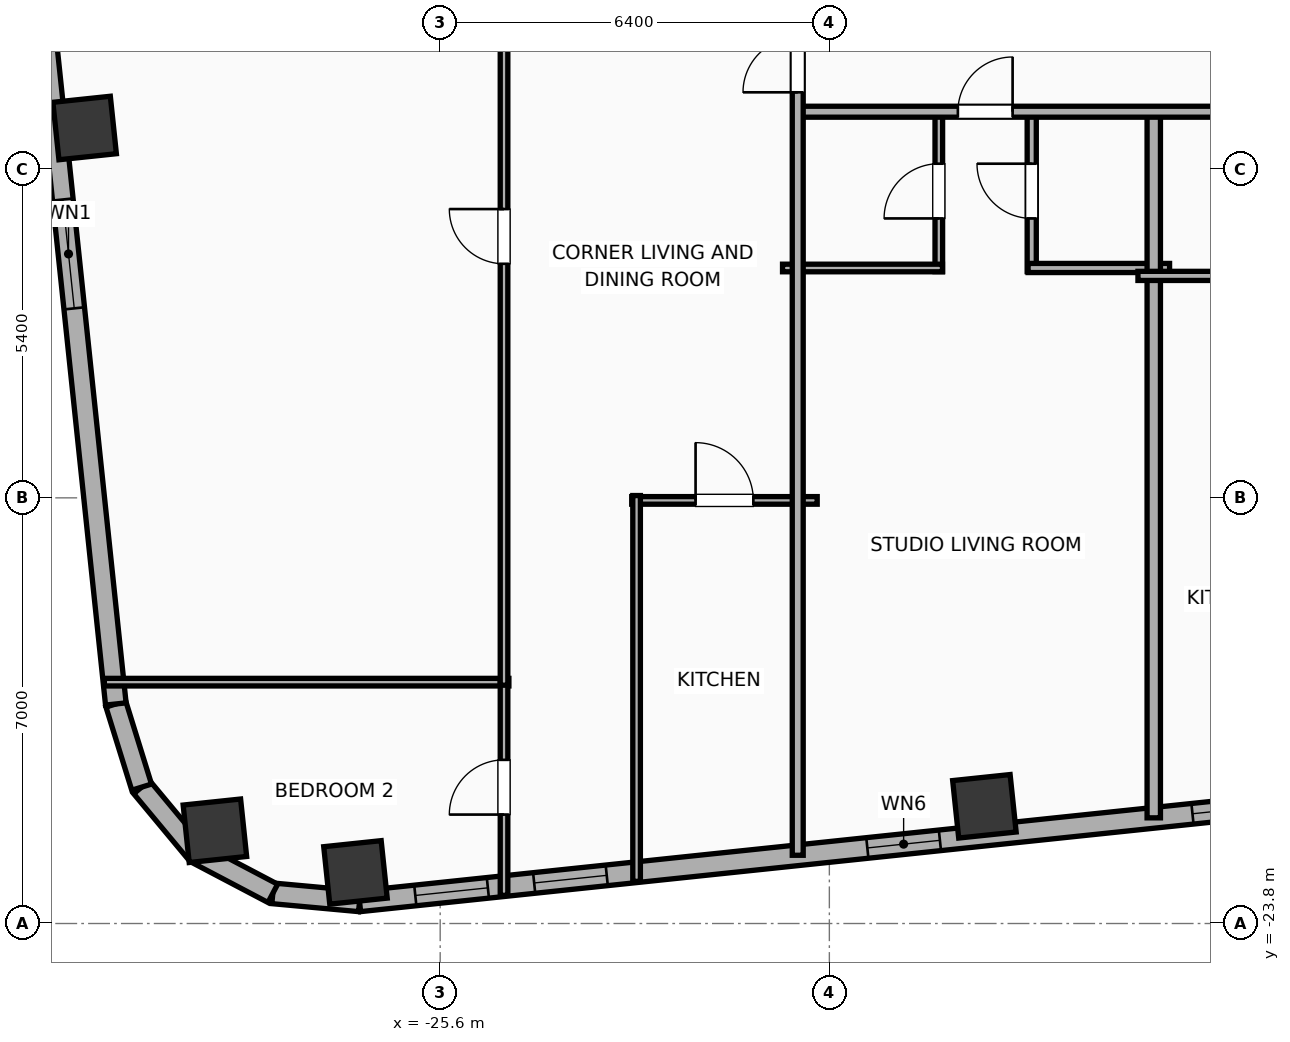
"""IFC4 building model, lengths in metres.
Left out: names, types, materials, properties, quantities, classifications, styles, units other than length and angle.
Written with IfcOpenShell. Run it as: python <this file> out.ifc"""

import sys

from ifc_helpers import new_model, si_unit, direction, frame, frame_2d, origin, origin_2d, place, context, subcontext, project, spatial, rectangle, hollow_rectangle, hollow_circle, extrude, element, fill, save


model = new_model("IFC4")
c1 = context("Model", 3, precision=1e-05, world=origin(), true_north=direction((0.0, 1.0)))
c2 = subcontext(c1, "Body", "Model", "MODEL_VIEW")
j1 = project(units=[si_unit("LENGTHUNIT", "METRE"), si_unit("PLANEANGLEUNIT", "RADIAN")], contexts=[c1])
p1 = place(None, origin())
s1 = spatial("IfcSite", under=j1, at=p1, CompositionType="ELEMENT")
p2 = place(p1, origin())
s2 = spatial("IfcBuilding", under=s1, at=p2, CompositionType="ELEMENT")
p3 = place(p2, frame((0.0, 0.0, 159.9)))
s3 = spatial("IfcBuildingStorey", under=s2, at=p3, CompositionType="ELEMENT", Elevation=159.9)
for number, where, z_axis, x_axis in (
    (1, (-26.993, -22.959, 0.0), (0.0, 0.0, 1.0), (0.995, 0.105, 0.0)),
    (2, (-16.65, -21.873, 0.0), (0.0, 0.0, 1.0), (0.995, 0.105, 0.0)),
    (3, (-31.447, -10.718, 0.0), (0.0, 0.0, 1.0), (0.995, 0.105, 0.0)),
):
    element("IfcColumn", number, at=place(p3, frame(where, z_axis=z_axis, x_axis=x_axis)), inside=s3, PredefinedType="COLUMN", context=c2, shape_type="SweptSolid", body=[
        extrude(hollow_rectangle(XDim=0.95, YDim=0.95, WallThickness=0.032, at=origin_2d()), origin(), (0.0, 0.0, 1.0), 3.9),
    ])
p4 = place(p3, frame((-29.305, -22.275, 0.0), z_axis=(0.0, 0.0, 1.0), x_axis=(0.994521895368, 0.104528463268, 0.0)))
e4 = element("IfcColumn", 4, at=p4, inside=s3, PredefinedType="COLUMN", context=c2, shape_type="SweptSolid", body=[
    extrude(hollow_circle(Radius=0.475, WallThickness=0.032, at=origin_2d()), origin(), (0.0, 0.0, 1.0), 3.9),
])
p5 = place(p3, frame((24.756, -18.003, 0.0), z_axis=(0.0, 0.0, 1.0), x_axis=(-0.99452160744, -0.104531202687, 0.0)))
e5 = element("IfcWall", 5, at=p5, inside=s3, PredefinedType="ELEMENTEDWALL", context=c2, shape_type="SweptSolid", body=[
    extrude(rectangle(XDim=51.967, YDim=0.34, at=frame_2d((25.983, 0.0))), origin(), (0.0, 0.0, 1.0), 3.65),
])
p6 = place(p5, frame((25.633, 0.0, 0.75)))
e6 = element("IfcOpeningElement", 6, at=p6, cuts=e5, PredefinedType="OPENING", context=c2, shape_type="SweptSolid", body=[
    extrude(rectangle(XDim=2.4, YDim=2.1, at=frame_2d((1.2, 1.05))), frame((0.0, 0.18, 0.0), z_axis=(0.0, -1.0, 0.0), x_axis=(1.0, 0.0, 0.0)), (0.0, 0.0, 1.0), 0.36),
])
p7 = place(p5, frame((42.369, 0.0, 0.75)))
e7 = element("IfcOpeningElement", 7, at=p7, cuts=e5, PredefinedType="OPENING", context=c2, shape_type="SweptSolid", body=[
    extrude(rectangle(XDim=1.2, YDim=2.05, at=frame_2d((0.6, 1.025))), frame((0.0, 0.18, 0.0), z_axis=(0.0, -1.0, 0.0), x_axis=(1.0, 0.0, 0.0)), (0.0, 0.0, 1.0), 0.36),
])
p8 = place(p5, frame((34.085, 0.0, 0.75)))
e8 = element("IfcOpeningElement", 8, at=p8, cuts=e5, PredefinedType="OPENING", context=c2, shape_type="SweptSolid", body=[
    extrude(rectangle(XDim=1.2, YDim=2.05, at=frame_2d((0.6, 1.025))), frame((0.0, 0.18, 0.0), z_axis=(0.0, -1.0, 0.0), x_axis=(1.0, 0.0, 0.0)), (0.0, 0.0, 1.0), 0.36),
])
p9 = place(p5, frame((36.993, 0.0, 0.75)))
e9 = element("IfcOpeningElement", 9, at=p9, cuts=e5, PredefinedType="OPENING", context=c2, shape_type="SweptSolid", body=[
    extrude(rectangle(XDim=1.2, YDim=2.05, at=frame_2d((0.6, 1.025))), frame((0.0, 0.18, 0.0), z_axis=(0.0, -1.0, 0.0), x_axis=(1.0, 0.0, 0.0)), (0.0, 0.0, 1.0), 0.36),
])
p10 = place(p5, frame((14.397, 0.0, 0.75)))
e10 = element("IfcOpeningElement", 10, at=p10, cuts=e5, PredefinedType="OPENING", context=c2, shape_type="SweptSolid", body=[
    extrude(rectangle(XDim=1.2, YDim=2.05, at=frame_2d((0.6, 1.025))), frame((0.0, 0.18, 0.0), z_axis=(0.0, -1.0, 0.0), x_axis=(1.0, 0.0, 0.0)), (0.0, 0.0, 1.0), 0.36),
])
p11 = place(p5, frame((11.489, 0.0, 0.75)))
e11 = element("IfcOpeningElement", 11, at=p11, cuts=e5, PredefinedType="OPENING", context=c2, shape_type="SweptSolid", body=[
    extrude(rectangle(XDim=1.2, YDim=2.05, at=frame_2d((0.6, 1.025))), frame((0.0, 0.18, 0.0), z_axis=(0.0, -1.0, 0.0), x_axis=(1.0, 0.0, 0.0)), (0.0, 0.0, 1.0), 0.36),
])
p12 = place(p5, frame((8.521, 0.0, 0.75)))
e12 = element("IfcOpeningElement", 12, at=p12, cuts=e5, PredefinedType="OPENING", context=c2, shape_type="SweptSolid", body=[
    extrude(rectangle(XDim=1.2, YDim=2.05, at=frame_2d((0.6, 1.025))), frame((0.0, 0.18, 0.0), z_axis=(0.0, -1.0, 0.0), x_axis=(1.0, 0.0, 0.0)), (0.0, 0.0, 1.0), 0.36),
])
p13 = place(p5, frame((5.582, 0.0, 0.75)))
e13 = element("IfcOpeningElement", 13, at=p13, cuts=e5, PredefinedType="OPENING", context=c2, shape_type="SweptSolid", body=[
    extrude(rectangle(XDim=1.2, YDim=2.05, at=frame_2d((0.6, 1.025))), frame((0.0, 0.18, 0.0), z_axis=(0.0, -1.0, 0.0), x_axis=(1.0, 0.0, 0.0)), (0.0, 0.0, 1.0), 0.36),
])
p14 = place(p5, frame((29.313, 0.0, 0.75)))
e14 = element("IfcOpeningElement", 14, at=p14, cuts=e5, PredefinedType="OPENING", context=c2, shape_type="SweptSolid", body=[
    extrude(rectangle(XDim=1.2, YDim=2.05, at=frame_2d((0.6, 1.025))), frame((0.0, 0.18, 0.0), z_axis=(0.0, -1.0, 0.0), x_axis=(1.0, 0.0, 0.0)), (0.0, 0.0, 1.0), 0.36),
])
p15 = place(p5, frame((22.248, 0.0, 0.75)))
e15 = element("IfcOpeningElement", 15, at=p15, cuts=e5, PredefinedType="OPENING", context=c2, shape_type="SweptSolid", body=[
    extrude(rectangle(XDim=1.2, YDim=2.05, at=frame_2d((0.6, 1.025))), frame((0.0, 0.18, 0.0), z_axis=(0.0, -1.0, 0.0), x_axis=(1.0, 0.0, 0.0)), (0.0, 0.0, 1.0), 0.36),
])
p16 = place(p5, frame((18.186, 0.0, 0.75)))
e16 = element("IfcOpeningElement", 16, at=p16, cuts=e5, PredefinedType="OPENING", context=c2, shape_type="SweptSolid", body=[
    extrude(rectangle(XDim=1.2, YDim=2.05, at=frame_2d((0.6, 1.025))), frame((0.0, 0.18, 0.0), z_axis=(0.0, -1.0, 0.0), x_axis=(1.0, 0.0, 0.0)), (0.0, 0.0, 1.0), 0.36),
])
p17 = place(p5, frame((47.879, 0.0, 0.75)))
e17 = element("IfcOpeningElement", 17, at=p17, cuts=e5, PredefinedType="OPENING", context=c2, shape_type="SweptSolid", body=[
    extrude(rectangle(XDim=1.2, YDim=2.05, at=frame_2d((0.6, 1.025))), frame((0.0, 0.18, 0.0), z_axis=(0.0, -1.0, 0.0), x_axis=(1.0, 0.0, 0.0)), (0.0, 0.0, 1.0), 0.36),
])
p18 = place(p5, frame((49.844, 0.0, 0.75)))
e18 = element("IfcOpeningElement", 18, at=p18, cuts=e5, PredefinedType="OPENING", context=c2, shape_type="SweptSolid", body=[
    extrude(rectangle(XDim=1.2, YDim=2.05, at=frame_2d((0.6, 1.025))), frame((0.0, 0.18, 0.0), z_axis=(0.0, -1.0, 0.0), x_axis=(1.0, 0.0, 0.0)), (0.0, 0.0, 1.0), 0.36),
])
p19 = place(p3, frame((-26.926, -23.435, 0.0), z_axis=(0.0, 0.0, 1.0), x_axis=(-0.995800460351, 0.091550222087, 0.0)))
e19 = element("IfcWall", 19, at=p19, inside=s3, PredefinedType="ELEMENTEDWALL", context=c2, shape_type="SweptSolid", body=[
    extrude(rectangle(XDim=1.432, YDim=0.34, at=frame_2d((0.716, 0.0))), origin(), (0.0, 0.0, 1.0), 3.65),
])
p20 = place(p3, frame((-28.352, -23.304, 0.0), z_axis=(0.0, 0.0, 1.0), x_axis=(-0.884989312682, 0.465611336243, 0.0)))
e20 = element("IfcWall", 20, at=p20, inside=s3, PredefinedType="ELEMENTEDWALL", context=c2, shape_type="SweptSolid", body=[
    extrude(rectangle(XDim=1.415, YDim=0.34, at=frame_2d((0.708, 0.0))), origin(), (0.0, 0.0, 1.0), 3.65),
])
p21 = place(p3, frame((-29.605, -22.645, 0.0), z_axis=(0.0, 0.0, 1.0), x_axis=(-0.639437361921, 0.768843196093, 0.0)))
e21 = element("IfcWall", 21, at=p21, inside=s3, PredefinedType="ELEMENTEDWALL", context=c2, shape_type="SweptSolid", body=[
    extrude(rectangle(XDim=1.415, YDim=0.34, at=frame_2d((0.708, 0.0))), origin(), (0.0, 0.0, 1.0), 3.65),
])
p22 = place(p3, frame((-30.51, -21.557, 0.0), z_axis=(0.0, 0.0, 1.0), x_axis=(-0.296624409546, 0.9549942197, 0.0)))
e22 = element("IfcWall", 22, at=p22, inside=s3, PredefinedType="ELEMENTEDWALL", context=c2, shape_type="SweptSolid", body=[
    extrude(rectangle(XDim=1.432, YDim=0.34, at=frame_2d((0.716, 0.0))), origin(), (0.0, 0.0, 1.0), 3.65),
])
p23 = place(p3, frame((-30.934, -20.19, 0.0), z_axis=(0.0, 0.0, 1.0), x_axis=(-0.10452691388, 0.994522058214, 0.0)))
e23 = element("IfcWall", 23, at=p23, inside=s3, PredefinedType="ELEMENTEDWALL", context=c2, shape_type="SweptSolid", body=[
    extrude(rectangle(XDim=33.167, YDim=0.34, at=frame_2d((16.583, 0.0))), origin(), (0.0, 0.0, 1.0), 3.65),
])
p24 = place(p23, frame((6.542, 0.0, 0.75)))
e24 = element("IfcOpeningElement", 24, at=p24, cuts=e23, PredefinedType="OPENING", context=c2, shape_type="SweptSolid", body=[
    extrude(rectangle(XDim=1.8, YDim=2.1, at=frame_2d((0.9, 1.05))), frame((0.0, 0.18, 0.0), z_axis=(0.0, -1.0, 0.0), x_axis=(1.0, 0.0, 0.0)), (0.0, 0.0, 1.0), 0.36),
])
p25 = place(p23, frame((24.825, 0.0, 0.75)))
e25 = element("IfcOpeningElement", 25, at=p25, cuts=e23, PredefinedType="OPENING", context=c2, shape_type="SweptSolid", body=[
    extrude(rectangle(XDim=1.8, YDim=2.1, at=frame_2d((0.9, 1.05))), frame((0.0, 0.18, 0.0), z_axis=(0.0, -1.0, 0.0), x_axis=(1.0, 0.0, 0.0)), (0.0, 0.0, 1.0), 0.36),
])
p26 = place(p23, frame((16.344, 0.0, 0.75)))
e26 = element("IfcOpeningElement", 26, at=p26, cuts=e23, PredefinedType="OPENING", context=c2, shape_type="SweptSolid", body=[
    extrude(rectangle(XDim=1.2, YDim=2.05, at=frame_2d((0.6, 1.025))), frame((0.0, 0.18, 0.0), z_axis=(0.0, -1.0, 0.0), x_axis=(1.0, 0.0, 0.0)), (0.0, 0.0, 1.0), 0.36),
])
p27 = place(p23, frame((19.811, 0.0, 0.75)))
e27 = element("IfcOpeningElement", 27, at=p27, cuts=e23, PredefinedType="OPENING", context=c2, shape_type="SweptSolid", body=[
    extrude(rectangle(XDim=1.2, YDim=2.05, at=frame_2d((0.6, 1.025))), frame((0.0, 0.18, 0.0), z_axis=(0.0, -1.0, 0.0), x_axis=(1.0, 0.0, 0.0)), (0.0, 0.0, 1.0), 0.36),
])
p28 = place(p3, frame((-17.4, -13.08, 0.0), z_axis=(0.0, 0.0, 1.0), x_axis=(0.0, 1.0, 0.0)))
e28 = element("IfcWall", 28, at=p28, inside=s3, PredefinedType="PARTITIONING", context=c2, shape_type="SweptSolid", body=[
    extrude(rectangle(XDim=2.65, YDim=0.125, at=frame_2d((1.325, 0.0))), origin(), (0.0, 0.0, 1.0), 3.65),
])
p29 = place(p28, frame((0.875, 0.0, 0.0)))
e29 = element("IfcOpeningElement", 29, at=p29, cuts=e28, PredefinedType="OPENING", context=c2, shape_type="SweptSolid", body=[
    extrude(rectangle(XDim=0.9, YDim=2.05, at=frame_2d((0.45, 1.025))), frame((0.0, 0.073, 0.0), z_axis=(0.0, -1.0, 0.0), x_axis=(1.0, 0.0, 0.0)), (0.0, 0.0, 1.0), 0.145),
])
p30 = place(p3, frame((-15.872, -13.08, 0.0), z_axis=(0.0, 0.0, 1.0), x_axis=(0.0, 1.0, 0.0)))
e30 = element("IfcWall", 30, at=p30, inside=s3, PredefinedType="PLUMBINGWALL", context=c2, shape_type="SweptSolid", body=[
    extrude(rectangle(XDim=2.65, YDim=0.15, at=frame_2d((1.325, 0.0))), origin(), (0.0, 0.0, 1.0), 3.04),
])
p31 = place(p30, frame((0.875, 0.0, 0.0)))
e31 = element("IfcOpeningElement", 31, at=p31, cuts=e30, PredefinedType="OPENING", context=c2, shape_type="SweptSolid", body=[
    extrude(rectangle(XDim=0.9, YDim=2.05, at=frame_2d((0.45, 1.025))), frame((0.0, 0.085, 0.0), z_axis=(0.0, -1.0, 0.0), x_axis=(1.0, 0.0, 0.0)), (0.0, 0.0, 1.0), 0.17),
])
p32 = place(p3, frame((-19.97, -13.02, 0.0), z_axis=(0.0, 0.0, 1.0), x_axis=(1.0, 0.0, 0.0)))
e32 = element("IfcWall", 32, at=p32, inside=s3, PredefinedType="PARTITIONING", context=c2, shape_type="SweptSolid", body=[
    extrude(rectangle(XDim=2.63, YDim=0.125, at=frame_2d((1.315, 0.0))), origin(), (0.0, 0.0, 1.0), 3.65),
])
p33 = place(p3, frame((-15.932, -13.02, 0.0), z_axis=(0.0, 0.0, 1.0), x_axis=(1.0, 0.0, 0.0)))
e33 = element("IfcWall", 33, at=p33, inside=s3, PredefinedType="PLUMBINGWALL", context=c2, shape_type="SweptSolid", body=[
    extrude(rectangle(XDim=2.327, YDim=0.15, at=frame_2d((1.164, 0.0))), origin(), (0.0, 0.0, 1.0), 3.65),
])
p34 = place(p3, frame((-13.865, -22.062, 0.0), z_axis=(0.0, 0.0, 1.0), x_axis=(0.0, 1.0, 0.0)))
e34 = element("IfcWall", 34, at=p34, inside=s3, PredefinedType="PARTITIONING", context=c2, shape_type="SweptSolid", body=[
    extrude(rectangle(XDim=11.692, YDim=0.22, at=frame_2d((5.846, 0.0))), origin(), (0.0, 0.0, 1.0), 3.65),
])
p35 = place(p3, frame((-14.125, -13.15, 0.0), z_axis=(0.0, 0.0, 1.0), x_axis=(1.0, 0.0, 0.0)))
e35 = element("IfcWall", 35, at=p35, inside=s3, PredefinedType="PLUMBINGWALL", context=c2, shape_type="SweptSolid", body=[
    extrude(rectangle(XDim=2.802, YDim=0.15, at=frame_2d((1.401, 0.0))), origin(), (0.0, 0.0, 1.0), 3.65),
])
p36 = place(p3, frame((-19.75, -10.45, 0.0), z_axis=(0.0, 0.0, 1.0), x_axis=(1.0, 0.0, 0.0)))
e36 = element("IfcWall", 36, at=p36, inside=s3, PredefinedType="PARTITIONING", context=c2, shape_type="SweptSolid", body=[
    extrude(rectangle(XDim=11.67, YDim=0.18, at=frame_2d((5.835, 0.0))), origin(), (0.0, 0.0, 1.0), 3.65),
])
p37 = place(p36, frame((2.664, 0.0, 0.0)))
e37 = element("IfcOpeningElement", 37, at=p37, cuts=e36, PredefinedType="OPENING", context=c2, shape_type="SweptSolid", body=[
    extrude(rectangle(XDim=0.9, YDim=2.05, at=frame_2d((0.45, 1.025))), frame((0.0, 0.1, 0.0), z_axis=(0.0, -1.0, 0.0), x_axis=(1.0, 0.0, 0.0)), (0.0, 0.0, 1.0), 0.2),
])
p38 = place(p36, frame((9.404, 0.0, 0.0)))
e38 = element("IfcOpeningElement", 38, at=p38, cuts=e36, PredefinedType="OPENING", context=c2, shape_type="SweptSolid", body=[
    extrude(rectangle(XDim=1.15, YDim=2.05, at=frame_2d((0.575, 1.025))), frame((0.0, 0.1, 0.0), z_axis=(0.0, -1.0, 0.0), x_axis=(1.0, 0.0, 0.0)), (0.0, 0.0, 1.0), 0.2),
])
p39 = place(p3, frame((-31.123, -19.831, 0.0), z_axis=(0.0, 0.0, 1.0), x_axis=(1.0, 0.0, 0.0)))
e39 = element("IfcWall", 39, at=p39, inside=s3, PredefinedType="PARTITIONING", context=c2, shape_type="SweptSolid", body=[
    extrude(rectangle(XDim=6.653, YDim=0.125, at=frame_2d((3.326, 0.0))), origin(), (0.0, 0.0, 1.0), 3.65),
])
p40 = place(p3, frame((-24.55, -23.336, 0.0), z_axis=(0.0, 0.0, 1.0), x_axis=(0.0, 1.0, 0.0)))
e40 = element("IfcWall", 40, at=p40, inside=s3, PredefinedType="PARTITIONING", context=c2, shape_type="SweptSolid", body=[
    extrude(rectangle(XDim=3.555, YDim=0.125, at=frame_2d((1.778, 0.0))), origin(), (0.0, 0.0, 1.0), 3.65),
])
p41 = place(p40, frame((1.328, 0.0, 0.0)))
e41 = element("IfcOpeningElement", 41, at=p41, cuts=e40, PredefinedType="OPENING", context=c2, shape_type="SweptSolid", body=[
    extrude(rectangle(XDim=0.9, YDim=2.05, at=frame_2d((0.45, 1.025))), frame((0.0, 0.073, 0.0), z_axis=(0.0, -1.0, 0.0), x_axis=(1.0, 0.0, 0.0)), (0.0, 0.0, 1.0), 0.145),
])
p42 = place(p3, frame((-24.55, -19.881, 0.0), z_axis=(0.0, 0.0, 1.0), x_axis=(0.0, 1.0, 0.0)))
e42 = element("IfcWall", 42, at=p42, inside=s3, PredefinedType="PARTITIONING", context=c2, shape_type="SweptSolid", body=[
    extrude(rectangle(XDim=14.76, YDim=0.125, at=frame_2d((7.38, 0.0))), origin(), (0.0, 0.0, 1.0), 3.65),
])
p43 = place(p42, frame((6.93, 0.0, 0.0)))
e43 = element("IfcOpeningElement", 43, at=p43, cuts=e42, PredefinedType="OPENING", context=c2, shape_type="SweptSolid", body=[
    extrude(rectangle(XDim=0.9, YDim=2.05, at=frame_2d((0.45, 1.025))), frame((0.0, 0.073, 0.0), z_axis=(0.0, -1.0, 0.0), x_axis=(1.0, 0.0, 0.0)), (0.0, 0.0, 1.0), 0.145),
])
p44 = place(p3, frame((-22.45, -16.842, 0.0), z_axis=(0.0, 0.0, 1.0), x_axis=(1.0, 0.0, 0.0)))
e44 = element("IfcWall", 44, at=p44, inside=s3, PredefinedType="PARTITIONING", context=c2, shape_type="SweptSolid", body=[
    extrude(rectangle(XDim=3.05, YDim=0.125, at=frame_2d((1.525, 0.0))), origin(), (0.0, 0.0, 1.0), 3.65),
])
p45 = place(p44, frame((1.05, 0.0, 0.0)))
e45 = element("IfcOpeningElement", 45, at=p45, cuts=e44, PredefinedType="OPENING", context=c2, shape_type="SweptSolid", body=[
    extrude(rectangle(XDim=0.95, YDim=2.05, at=frame_2d((0.475, 1.025))), frame((0.0, 0.073, 0.0), z_axis=(0.0, -1.0, 0.0), x_axis=(1.0, 0.0, 0.0)), (0.0, 0.0, 1.0), 0.145),
])
p46 = place(p3, frame((-22.37, -23.107, 0.0), z_axis=(0.0, 0.0, 1.0), x_axis=(0.0, 1.0, 0.0)))
e46 = element("IfcWall", 46, at=p46, inside=s3, PredefinedType="PARTITIONING", context=c2, shape_type="SweptSolid", body=[
    extrude(rectangle(XDim=6.345, YDim=0.125, at=frame_2d((3.173, 0.0))), origin(), (0.0, 0.0, 1.0), 3.65),
])
p47 = place(p3, frame((-19.72, -22.678, 0.0), z_axis=(0.0, 0.0, 1.0), x_axis=(0.0, 1.0, 0.0)))
e47 = element("IfcWall", 47, at=p47, inside=s3, PredefinedType="PARTITIONING", context=c2, shape_type="SweptSolid", body=[
    extrude(rectangle(XDim=21.178, YDim=0.18, at=frame_2d((10.589, 0.0))), origin(), (0.0, 0.0, 1.0), 3.65),
])
p48 = place(p47, frame((12.547, 0.0, 0.0)))
e48 = element("IfcOpeningElement", 48, at=p48, cuts=e47, PredefinedType="OPENING", context=c2, shape_type="SweptSolid", body=[
    extrude(rectangle(XDim=0.9, YDim=2.05, at=frame_2d((0.45, 1.025))), frame((0.0, 0.1, 0.0), z_axis=(0.0, -1.0, 0.0), x_axis=(1.0, 0.0, 0.0)), (0.0, 0.0, 1.0), 0.2),
])
p49 = place(p24, origin())
e49 = element("IfcWindow", 49, at=p49, inside=s3, PartitioningType="SINGLE_PANEL", PredefinedType="WINDOW", context=c2, shape_type="SweptSolid", body=[
    extrude(rectangle(XDim=1.8, YDim=2.1, at=frame_2d((0.9, 1.05))), frame((0.0, 0.03, 0.0), z_axis=(0.0, -1.0, 0.0), x_axis=(1.0, 0.0, 0.0)), (0.0, 0.0, 1.0), 0.06),
])
fill(e24, e49)
p50 = place(p7, origin())
e50 = element("IfcWindow", 50, at=p50, inside=s3, PartitioningType="SINGLE_PANEL", PredefinedType="WINDOW", context=c2, shape_type="SweptSolid", body=[
    extrude(rectangle(XDim=1.2, YDim=2.05, at=frame_2d((0.6, 1.025))), frame((0.0, 0.03, 0.0), z_axis=(0.0, -1.0, 0.0), x_axis=(1.0, 0.0, 0.0)), (0.0, 0.0, 1.0), 0.06),
])
fill(e7, e50)
p51 = place(p9, origin())
e51 = element("IfcWindow", 51, at=p51, inside=s3, PartitioningType="SINGLE_PANEL", PredefinedType="WINDOW", context=c2, shape_type="SweptSolid", body=[
    extrude(rectangle(XDim=1.2, YDim=2.05, at=frame_2d((0.6, 1.025))), frame((0.0, 0.03, 0.0), z_axis=(0.0, -1.0, 0.0), x_axis=(1.0, 0.0, 0.0)), (0.0, 0.0, 1.0), 0.06),
])
fill(e9, e51)
p52 = place(p17, origin())
e52 = element("IfcWindow", 52, at=p52, inside=s3, PartitioningType="SINGLE_PANEL", PredefinedType="WINDOW", context=c2, shape_type="SweptSolid", body=[
    extrude(rectangle(XDim=1.2, YDim=2.05, at=frame_2d((0.6, 1.025))), frame((0.0, 0.03, 0.0), z_axis=(0.0, -1.0, 0.0), x_axis=(1.0, 0.0, 0.0)), (0.0, 0.0, 1.0), 0.06),
])
fill(e17, e52)
p53 = place(p18, origin())
e53 = element("IfcWindow", 53, at=p53, inside=s3, PartitioningType="SINGLE_PANEL", PredefinedType="WINDOW", context=c2, shape_type="SweptSolid", body=[
    extrude(rectangle(XDim=1.2, YDim=2.05, at=frame_2d((0.6, 1.025))), frame((0.0, 0.03, 0.0), z_axis=(0.0, -1.0, 0.0), x_axis=(1.0, 0.0, 0.0)), (0.0, 0.0, 1.0), 0.06),
])
fill(e18, e53)
p54 = place(p29, origin())
e54 = element("IfcDoor", 54, at=p54, inside=s3, OperationType="SINGLE_SWING_LEFT", PredefinedType="DOOR", context=c2, shape_type="SweptSolid", body=[
    extrude(rectangle(XDim=0.9, YDim=2.05, at=frame_2d((0.45, 1.025))), frame((0.0, 0.025, 0.0), z_axis=(0.0, -1.0, 0.0), x_axis=(1.0, 0.0, 0.0)), (0.0, 0.0, 1.0), 0.05),
])
fill(e29, e54)
p55 = place(p31, origin())
e55 = element("IfcDoor", 55, at=p55, inside=s3, OperationType="SINGLE_SWING_RIGHT", PredefinedType="DOOR", context=c2, shape_type="SweptSolid", body=[
    extrude(rectangle(XDim=0.9, YDim=2.05, at=frame_2d((0.45, 1.025))), frame((0.0, 0.025, 0.0), z_axis=(0.0, -1.0, 0.0), x_axis=(1.0, 0.0, 0.0)), (0.0, 0.0, 1.0), 0.05),
])
fill(e31, e55)
p56 = place(p37, origin())
e56 = element("IfcDoor", 56, at=p56, inside=s3, OperationType="SINGLE_SWING_RIGHT", PredefinedType="DOOR", context=c2, shape_type="SweptSolid", body=[
    extrude(rectangle(XDim=0.9, YDim=2.05, at=frame_2d((0.45, 1.025))), frame((0.0, 0.025, 0.0), z_axis=(0.0, -1.0, 0.0), x_axis=(1.0, 0.0, 0.0)), (0.0, 0.0, 1.0), 0.05),
])
fill(e37, e56)
p57 = place(p41, origin())
e57 = element("IfcDoor", 57, at=p57, inside=s3, OperationType="SINGLE_SWING_LEFT", PredefinedType="DOOR", context=c2, shape_type="SweptSolid", body=[
    extrude(rectangle(XDim=0.9, YDim=2.05, at=frame_2d((0.45, 1.025))), frame((0.0, 0.025, 0.0), z_axis=(0.0, -1.0, 0.0), x_axis=(1.0, 0.0, 0.0)), (0.0, 0.0, 1.0), 0.05),
])
fill(e41, e57)
p58 = place(p43, origin())
e58 = element("IfcDoor", 58, at=p58, inside=s3, OperationType="SINGLE_SWING_RIGHT", PredefinedType="DOOR", context=c2, shape_type="SweptSolid", body=[
    extrude(rectangle(XDim=0.9, YDim=2.05, at=frame_2d((0.45, 1.025))), frame((0.0, 0.025, 0.0), z_axis=(0.0, -1.0, 0.0), x_axis=(1.0, 0.0, 0.0)), (0.0, 0.0, 1.0), 0.05),
])
fill(e43, e58)
p59 = place(p45, origin())
e59 = element("IfcDoor", 59, at=p59, inside=s3, OperationType="SINGLE_SWING_LEFT", PredefinedType="DOOR", context=c2, shape_type="SweptSolid", body=[
    extrude(rectangle(XDim=0.95, YDim=2.05, at=frame_2d((0.475, 1.025))), frame((0.0, 0.025, 0.0), z_axis=(0.0, -1.0, 0.0), x_axis=(1.0, 0.0, 0.0)), (0.0, 0.0, 1.0), 0.05),
])
fill(e45, e59)
p60 = place(p48, origin())
e60 = element("IfcDoor", 60, at=p60, inside=s3, OperationType="SINGLE_SWING_LEFT", PredefinedType="DOOR", context=c2, shape_type="SweptSolid", body=[
    extrude(rectangle(XDim=0.9, YDim=2.05, at=frame_2d((0.45, 1.025))), frame((0.0, 0.025, 0.0), z_axis=(0.0, -1.0, 0.0), x_axis=(1.0, 0.0, 0.0)), (0.0, 0.0, 1.0), 0.05),
])
fill(e48, e60)
save(model, sys.argv[1])
